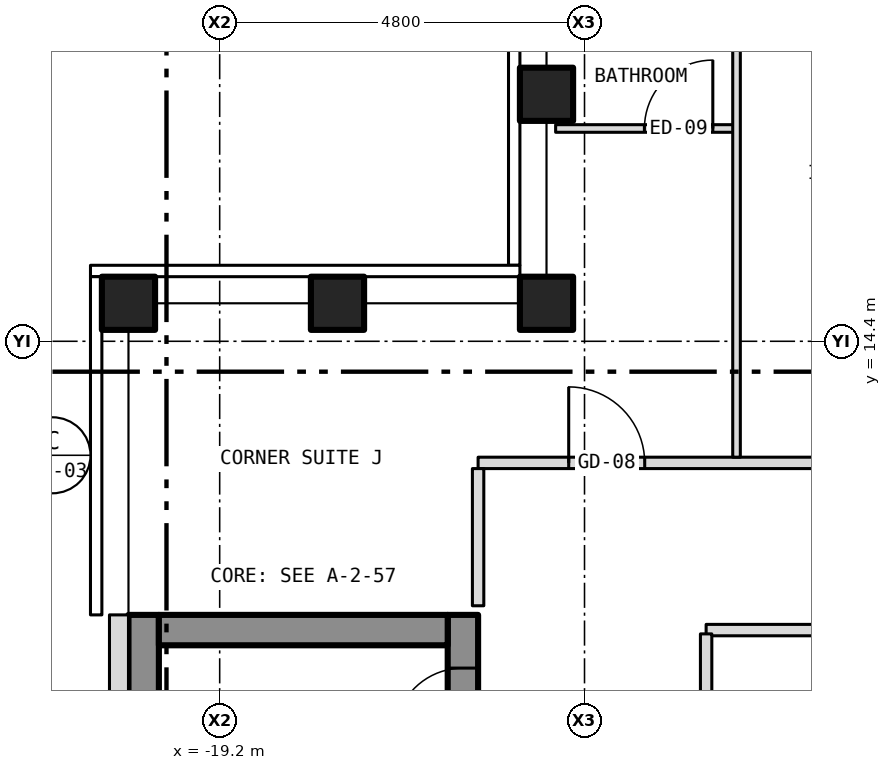
"""IFC4 building model, lengths in metres.
Left out: names, types, materials, properties, quantities, classifications, styles, units other than length and angle.
Written with IfcOpenShell. Run it as: python <this file> out.ifc"""

import sys

from ifc_helpers import new_model, si_unit, direction, frame, frame_2d, origin, origin_2d, place, context, subcontext, project, spatial, rectangle, hollow_rectangle, extrude, element, fill, save


model = new_model("IFC4")
c1 = context("Model", 3, precision=1e-05, world=origin(), true_north=direction((0.0, 1.0)))
c2 = subcontext(c1, "Body", "Model", "MODEL_VIEW")
j1 = project(units=[si_unit("LENGTHUNIT", "METRE"), si_unit("PLANEANGLEUNIT", "RADIAN")], contexts=[c1])
p1 = place(None, origin())
s1 = spatial("IfcSite", under=j1, at=p1, CompositionType="ELEMENT")
p2 = place(p1, origin())
s2 = spatial("IfcBuilding", under=s1, at=p2, CompositionType="ELEMENT")
p3 = place(p2, frame((0.0, 0.0, 208.5)))
s3 = spatial("IfcBuildingStorey", under=s2, at=p3, CompositionType="ELEMENT", Elevation=208.5)
for number, where, z_axis, x_axis in (
    (1, (-20.4, 14.9, -0.15), (0.0, 0.0, 1.0), (1.0, 0.0, 0.0)),
    (2, (-14.9, 14.9, -0.15), (0.0, 0.0, 1.0), (1.0, 0.0, 0.0)),
    (3, (-14.9, 17.65, -0.15), (0.0, 0.0, 1.0), (1.0, 0.0, 0.0)),
    (4, (-17.65, 14.9, -0.15), (0.0, 0.0, 1.0), (1.0, 0.0, 0.0)),
):
    element("IfcColumn", number, at=place(p3, frame(where, z_axis=z_axis, x_axis=x_axis)), inside=s3, PredefinedType="COLUMN", context=c2, shape_type="SweptSolid", body=[
        extrude(hollow_rectangle(XDim=0.7, YDim=0.7, WallThickness=0.04, at=origin_2d()), origin(), (0.0, 0.0, 1.0), 3.5),
    ])
p4 = place(p3, frame((-16.0, -10.8, 0.0), z_axis=(0.0, 0.0, 1.0), x_axis=(0.0, 1.0, 0.0)))
e5 = element("IfcWall", 5, at=p4, inside=s3, PredefinedType="SHEAR", context=c2, shape_type="SweptSolid", body=[
    extrude(rectangle(XDim=21.6, YDim=0.4, at=frame_2d((10.8, 0.0))), origin(), (0.0, 0.0, 1.0), 3.25),
])
p5 = place(p4, frame((9.4, 0.0, 0.0)))
e6 = element("IfcOpeningElement", 6, at=p5, cuts=e5, PredefinedType="OPENING", context=c2, shape_type="SweptSolid", body=[
    extrude(rectangle(XDim=1.1, YDim=2.1, at=frame_2d((0.55, 1.05))), frame((0.0, 0.212, 0.0), z_axis=(0.0, -1.0, 0.0), x_axis=(1.0, 0.0, 0.0)), (0.0, 0.0, 1.0), 0.424),
])
p6 = place(p4, frame((11.5, 0.0, 0.0)))
e7 = element("IfcOpeningElement", 7, at=p6, cuts=e5, PredefinedType="OPENING", context=c2, shape_type="SweptSolid", body=[
    extrude(rectangle(XDim=1.1, YDim=2.1, at=frame_2d((0.55, 1.05))), frame((0.0, 0.212, 0.0), z_axis=(0.0, -1.0, 0.0), x_axis=(1.0, 0.0, 0.0)), (0.0, 0.0, 1.0), 0.424),
])
p7 = place(p4, frame((13.6, 0.0, 0.0)))
e8 = element("IfcOpeningElement", 8, at=p7, cuts=e5, PredefinedType="OPENING", context=c2, shape_type="SweptSolid", body=[
    extrude(rectangle(XDim=1.1, YDim=2.1, at=frame_2d((0.55, 1.05))), frame((0.0, 0.212, 0.0), z_axis=(0.0, -1.0, 0.0), x_axis=(1.0, 0.0, 0.0)), (0.0, 0.0, 1.0), 0.424),
])
p8 = place(p4, frame((15.7, 0.0, 0.0)))
e9 = element("IfcOpeningElement", 9, at=p8, cuts=e5, PredefinedType="OPENING", context=c2, shape_type="SweptSolid", body=[
    extrude(rectangle(XDim=1.1, YDim=2.1, at=frame_2d((0.55, 1.05))), frame((0.0, 0.212, 0.0), z_axis=(0.0, -1.0, 0.0), x_axis=(1.0, 0.0, 0.0)), (0.0, 0.0, 1.0), 0.424),
])
p9 = place(p4, frame((17.8, 0.0, 0.0)))
e10 = element("IfcOpeningElement", 10, at=p9, cuts=e5, PredefinedType="OPENING", context=c2, shape_type="SweptSolid", body=[
    extrude(rectangle(XDim=1.1, YDim=2.1, at=frame_2d((0.55, 1.05))), frame((0.0, 0.212, 0.0), z_axis=(0.0, -1.0, 0.0), x_axis=(1.0, 0.0, 0.0)), (0.0, 0.0, 1.0), 0.424),
])
p10 = place(p4, frame((0.458, 0.0, 0.0)))
e11 = element("IfcOpeningElement", 11, at=p10, cuts=e5, PredefinedType="OPENING", context=c2, shape_type="SweptSolid", body=[
    extrude(rectangle(XDim=1.1, YDim=2.1, at=frame_2d((0.55, 1.05))), frame((0.0, 0.212, 0.0), z_axis=(0.0, -1.0, 0.0), x_axis=(1.0, 0.0, 0.0)), (0.0, 0.0, 1.0), 0.424),
])
p11 = place(p4, frame((7.5, 0.0, 0.0)))
e12 = element("IfcOpeningElement", 12, at=p11, cuts=e5, PredefinedType="OPENING", context=c2, shape_type="SweptSolid", body=[
    extrude(rectangle(XDim=1.1, YDim=2.1, at=frame_2d((0.55, 1.05))), frame((0.0, 0.212, 0.0), z_axis=(0.0, -1.0, 0.0), x_axis=(1.0, 0.0, 0.0)), (0.0, 0.0, 1.0), 0.424),
])
p12 = place(p4, frame((20.0, 0.0, 0.0)))
e13 = element("IfcOpeningElement", 13, at=p12, cuts=e5, PredefinedType="OPENING", context=c2, shape_type="SweptSolid", body=[
    extrude(rectangle(XDim=0.9, YDim=2.1, at=frame_2d((0.45, 1.05))), frame((0.0, 0.212, 0.0), z_axis=(0.0, -1.0, 0.0), x_axis=(1.0, 0.0, 0.0)), (0.0, 0.0, 1.0), 0.424),
])
p13 = place(p3, frame((-20.2, -10.8, 0.0), z_axis=(0.0, 0.0, 1.0), x_axis=(0.0, 1.0, 0.0)))
e14 = element("IfcWall", 14, at=p13, inside=s3, PredefinedType="SHEAR", context=c2, shape_type="SweptSolid", body=[
    extrude(rectangle(XDim=21.6, YDim=0.4, at=frame_2d((10.8, 0.0))), origin(), (0.0, 0.0, 1.0), 3.25),
])
p14 = place(p3, frame((-20.0, 10.6, 0.0), z_axis=(0.0, 0.0, 1.0), x_axis=(1.0, 0.0, 0.0)))
e15 = element("IfcWall", 15, at=p14, inside=s3, PredefinedType="SHEAR", context=c2, shape_type="SweptSolid", body=[
    extrude(rectangle(XDim=3.8, YDim=0.4, at=frame_2d((1.9, 0.0))), origin(), (0.0, 0.0, 1.0), 3.25),
])
p15 = place(p3, frame((-20.525, 10.8, 0.0), z_axis=(0.0, 0.0, 1.0), x_axis=(0.0, -1.0, 0.0)))
e16 = element("IfcWall", 16, at=p15, inside=s3, PredefinedType="SOLIDWALL", context=c2, shape_type="SweptSolid", body=[
    extrude(rectangle(XDim=21.6, YDim=0.25, at=frame_2d((10.8, 0.0))), origin(), (0.0, 0.0, 1.0), 3.5),
])
p16 = place(p15, frame((18.05, 0.0, 1.0)))
e17 = element("IfcOpeningElement", 17, at=p16, cuts=e16, PredefinedType="OPENING", context=c2, shape_type="SweptSolid", body=[
    extrude(rectangle(XDim=0.6, YDim=1.5, at=frame_2d((0.3, 0.75))), frame((0.0, 0.137, 0.0), z_axis=(0.0, -1.0, 0.0), x_axis=(1.0, 0.0, 0.0)), (0.0, 0.0, 1.0), 0.274),
])
p17 = place(p3, frame((-12.8, 10.6, 0.0), z_axis=(0.0, 0.0, 1.0), x_axis=(1.0, 0.0, 0.0)))
e18 = element("IfcWall", 18, at=p17, inside=s3, PredefinedType="PARTITIONING", context=c2, shape_type="SweptSolid", body=[
    extrude(rectangle(XDim=13.9, YDim=0.15, at=frame_2d((6.95, 0.0))), origin(), (0.0, 0.0, 1.0), 3.35),
])
p18 = place(p17, frame((8.1, 0.0, 0.0)))
e19 = element("IfcOpeningElement", 19, at=p18, cuts=e18, PredefinedType="OPENING", context=c2, shape_type="SweptSolid", body=[
    extrude(rectangle(XDim=0.9, YDim=2.1, at=frame_2d((0.45, 1.05))), frame((0.0, 0.087, 0.0), z_axis=(0.0, -1.0, 0.0), x_axis=(1.0, 0.0, 0.0)), (0.0, 0.0, 1.0), 0.174),
])
p19 = place(p3, frame((-15.8, 12.8, 0.0), z_axis=(0.0, 0.0, 1.0), x_axis=(1.0, 0.0, 0.0)))
e20 = element("IfcWall", 20, at=p19, inside=s3, PredefinedType="PARTITIONING", context=c2, shape_type="SweptSolid", body=[
    extrude(rectangle(XDim=31.6, YDim=0.15, at=frame_2d((15.8, 0.0))), origin(), (0.0, 0.0, 1.0), 3.35),
])
p20 = place(p19, frame((5.417, 0.0, 0.0)))
e21 = element("IfcOpeningElement", 21, at=p20, cuts=e20, PredefinedType="OPENING", context=c2, shape_type="SweptSolid", body=[
    extrude(rectangle(XDim=0.9, YDim=2.1, at=frame_2d((0.45, 1.05))), frame((0.0, 0.087, 0.0), z_axis=(0.0, -1.0, 0.0), x_axis=(1.0, 0.0, 0.0)), (0.0, 0.0, 1.0), 0.174),
])
p21 = place(p19, frame((10.384, 0.0, 0.0)))
e22 = element("IfcOpeningElement", 22, at=p21, cuts=e20, PredefinedType="OPENING", context=c2, shape_type="SweptSolid", body=[
    extrude(rectangle(XDim=0.9, YDim=2.1, at=frame_2d((0.45, 1.05))), frame((0.0, 0.087, 0.0), z_axis=(0.0, -1.0, 0.0), x_axis=(1.0, 0.0, 0.0)), (0.0, 0.0, 1.0), 0.174),
])
p22 = place(p19, frame((14.2, 0.0, 0.0)))
e23 = element("IfcOpeningElement", 23, at=p22, cuts=e20, PredefinedType="OPENING", context=c2, shape_type="SweptSolid", body=[
    extrude(rectangle(XDim=1.0, YDim=2.1, at=frame_2d((0.5, 1.05))), frame((0.0, 0.087, 0.0), z_axis=(0.0, -1.0, 0.0), x_axis=(1.0, 0.0, 0.0)), (0.0, 0.0, 1.0), 0.174),
])
p23 = place(p19, frame((19.166, 0.0, 0.0)))
e24 = element("IfcOpeningElement", 24, at=p23, cuts=e20, PredefinedType="OPENING", context=c2, shape_type="SweptSolid", body=[
    extrude(rectangle(XDim=1.0, YDim=2.1, at=frame_2d((0.5, 1.05))), frame((0.0, 0.087, 0.0), z_axis=(0.0, -1.0, 0.0), x_axis=(1.0, 0.0, 0.0)), (0.0, 0.0, 1.0), 0.174),
])
p24 = place(p19, frame((24.134, 0.0, 0.0)))
e25 = element("IfcOpeningElement", 25, at=p24, cuts=e20, PredefinedType="OPENING", context=c2, shape_type="SweptSolid", body=[
    extrude(rectangle(XDim=1.0, YDim=2.1, at=frame_2d((0.5, 1.05))), frame((0.0, 0.087, 0.0), z_axis=(0.0, -1.0, 0.0), x_axis=(1.0, 0.0, 0.0)), (0.0, 0.0, 1.0), 0.174),
])
p25 = place(p19, frame((1.192, 0.0, 0.0)))
e26 = element("IfcOpeningElement", 26, at=p25, cuts=e20, PredefinedType="OPENING", context=c2, shape_type="SweptSolid", body=[
    extrude(rectangle(XDim=1.0, YDim=2.1, at=frame_2d((0.5, 1.05))), frame((0.0, 0.087, 0.0), z_axis=(0.0, -1.0, 0.0), x_axis=(1.0, 0.0, 0.0)), (0.0, 0.0, 1.0), 0.174),
])
p26 = place(p19, frame((29.409, 0.0, 0.0)))
e27 = element("IfcOpeningElement", 27, at=p26, cuts=e20, PredefinedType="OPENING", context=c2, shape_type="SweptSolid", body=[
    extrude(rectangle(XDim=1.0, YDim=2.1, at=frame_2d((0.5, 1.05))), frame((0.0, 0.087, 0.0), z_axis=(0.0, -1.0, 0.0), x_axis=(1.0, 0.0, 0.0)), (0.0, 0.0, 1.0), 0.174),
])
p27 = place(p3, frame((-14.78, 17.2, 0.0), z_axis=(0.0, 0.0, 1.0), x_axis=(1.0, 0.0, 0.0)))
e28 = element("IfcWall", 28, at=p27, inside=s3, PredefinedType="PARTITIONING", context=c2, shape_type="SweptSolid", body=[
    extrude(rectangle(XDim=2.38, YDim=0.1, at=frame_2d((1.19, 0.0))), origin(), (0.0, 0.0, 1.0), 3.35),
])
p28 = place(p27, frame((1.168, 0.0, 0.0)))
e29 = element("IfcOpeningElement", 29, at=p28, cuts=e28, PredefinedType="OPENING", context=c2, shape_type="SweptSolid", body=[
    extrude(rectangle(XDim=0.9, YDim=2.1, at=frame_2d((0.45, 1.05))), frame((0.0, 0.062, 0.0), z_axis=(0.0, -1.0, 0.0), x_axis=(1.0, 0.0, 0.0)), (0.0, 0.0, 1.0), 0.124),
])
p29 = place(p3, frame((-15.8, 10.92, 0.0), z_axis=(0.0, 0.0, 1.0), x_axis=(0.0, 1.0, 0.0)))
e30 = element("IfcWall", 30, at=p29, inside=s3, PredefinedType="PARTITIONING", context=c2, shape_type="SweptSolid", body=[
    extrude(rectangle(XDim=1.805, YDim=0.15, at=frame_2d((0.903, 0.0))), origin(), (0.0, 0.0, 1.0), 3.35),
])
p30 = place(p3, frame((-12.8, 8.175, 0.0), z_axis=(0.0, 0.0, 1.0), x_axis=(0.0, 1.0, 0.0)))
e31 = element("IfcWall", 31, at=p30, inside=s3, PredefinedType="PARTITIONING", context=c2, shape_type="SweptSolid", body=[
    extrude(rectangle(XDim=2.375, YDim=0.15, at=frame_2d((1.188, 0.0))), origin(), (0.0, 0.0, 1.0), 3.35),
])
p31 = place(p3, frame((-12.4, 12.875, 0.0), z_axis=(0.0, 0.0, 1.0), x_axis=(0.0, 1.0, 0.0)))
e32 = element("IfcWall", 32, at=p31, inside=s3, PredefinedType="PARTITIONING", context=c2, shape_type="SweptSolid", body=[
    extrude(rectangle(XDim=7.905, YDim=0.1, at=frame_2d((3.953, 0.0))), origin(), (0.0, 0.0, 1.0), 3.35),
])
p32 = place(p12, origin())
e33 = element("IfcDoor", 33, at=p32, inside=s3, OperationType="SINGLE_SWING_LEFT", PredefinedType="DOOR", context=c2, shape_type="SweptSolid", body=[
    extrude(rectangle(XDim=0.9, YDim=2.1, at=frame_2d((0.45, 1.05))), frame((0.0, 0.025, 0.0), z_axis=(0.0, -1.0, 0.0), x_axis=(1.0, 0.0, 0.0)), (0.0, 0.0, 1.0), 0.05),
])
fill(e13, e33)
p33 = place(p28, origin())
e34 = element("IfcDoor", 34, at=p33, inside=s3, OperationType="SINGLE_SWING_RIGHT", PredefinedType="DOOR", context=c2, shape_type="SweptSolid", body=[
    extrude(rectangle(XDim=0.9, YDim=2.1, at=frame_2d((0.45, 1.05))), frame((0.0, 0.025, 0.0), z_axis=(0.0, -1.0, 0.0), x_axis=(1.0, 0.0, 0.0)), (0.0, 0.0, 1.0), 0.05),
])
fill(e29, e34)
p34 = place(p25, origin())
e35 = element("IfcDoor", 35, at=p34, inside=s3, OperationType="SINGLE_SWING_LEFT", PredefinedType="DOOR", context=c2, shape_type="SweptSolid", body=[
    extrude(rectangle(XDim=1.0, YDim=2.1, at=frame_2d((0.5, 1.05))), frame((0.0, 0.025, 0.0), z_axis=(0.0, -1.0, 0.0), x_axis=(1.0, 0.0, 0.0)), (0.0, 0.0, 1.0), 0.05),
])
fill(e26, e35)
save(model, sys.argv[1])
